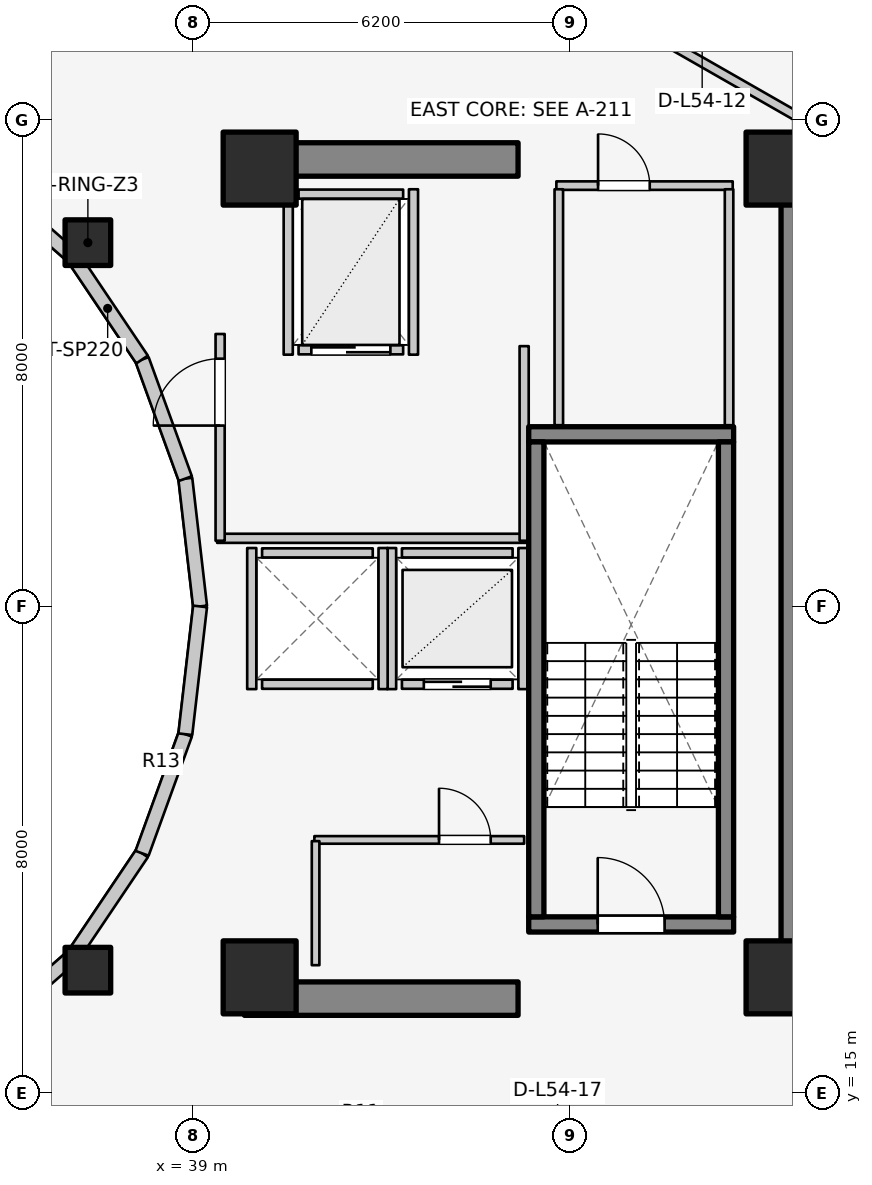
"""IFC4 building model, lengths in metres.
Left out: names, types, materials, properties, quantities, classifications, styles, units other than length and angle.
Written with IfcOpenShell. Run it as: python <this file> out.ifc"""

import sys

from ifc_helpers import new_model, si_unit, direction, frame, frame_2d, origin, origin_2d, place, context, subcontext, project, spatial, rectangle, extrude, element, fill, save


model = new_model("IFC4")
c1 = context("Model", 3, precision=1e-05, world=origin(), true_north=direction((0.0, 1.0)))
c2 = subcontext(c1, "Body", "Model", "MODEL_VIEW")
j1 = project(units=[si_unit("LENGTHUNIT", "METRE"), si_unit("PLANEANGLEUNIT", "RADIAN")], contexts=[c1])
p1 = place(None, origin())
s1 = spatial("IfcSite", under=j1, at=p1, CompositionType="ELEMENT")
p2 = place(p1, origin())
s2 = spatial("IfcBuilding", under=s1, at=p2, CompositionType="ELEMENT")
p3 = place(p2, frame((0.0, 0.0, 177.7)))
s3 = spatial("IfcBuildingStorey", under=s2, at=p3, CompositionType="ELEMENT", Elevation=177.7)
p4 = place(p3, frame((48.95, 17.05, 0.0), z_axis=(0.0, 0.0, 1.0), x_axis=(0.0, 1.0, 0.0)))
e1 = element("IfcWall", 1, at=p4, inside=s3, PredefinedType="SHEAR", context=c2, shape_type="SweptSolid", body=[
    extrude(rectangle(XDim=12.8, YDim=0.55, at=frame_2d((6.4, 0.0))), origin(), (0.0, 0.0, 1.0), 3.1),
])
for number, where, z_axis, x_axis in (
    (2, (39.85, 16.55, 0.0), (0.0, 0.0, 1.0), (1.0, 0.0, 0.0)),
    (3, (39.85, 30.35, 0.0), (0.0, 0.0, 1.0), (1.0, 0.0, 0.0)),
):
    element("IfcWall", number, at=place(p3, frame(where, z_axis=z_axis, x_axis=x_axis)), inside=s3, PredefinedType="SHEAR", context=c2, shape_type="SweptSolid", body=[
        extrude(rectangle(XDim=4.5, YDim=0.55, at=frame_2d((2.25, 0.0))), origin(), (0.0, 0.0, 1.0), 3.1),
    ])
p5 = place(p3, frame((44.525, 17.77, 0.0), z_axis=(0.0, 0.0, 1.0), x_axis=(1.0, 0.0, 0.0)))
e4 = element("IfcWall", 4, at=p5, inside=s3, PredefinedType="SOLIDWALL", context=c2, shape_type="SweptSolid", body=[
    extrude(rectangle(XDim=3.37, YDim=0.25, at=frame_2d((1.685, 0.0))), origin(), (0.0, 0.0, 1.0), 3.1),
])
p6 = place(p5, frame((1.135, 0.0, 0.0)))
e5 = element("IfcOpeningElement", 5, at=p6, cuts=e4, PredefinedType="OPENING", context=c2, shape_type="SweptSolid", body=[
    extrude(rectangle(XDim=1.1, YDim=2.1, at=frame_2d((0.55, 1.05))), frame((0.0, 0.135, 0.0), z_axis=(0.0, -1.0, 0.0), x_axis=(1.0, 0.0, 0.0)), (0.0, 0.0, 1.0), 0.27),
])
p7 = place(p3, frame((44.525, 25.83, 0.0), z_axis=(0.0, 0.0, 1.0), x_axis=(1.0, 0.0, 0.0)))
e6 = element("IfcWall", 6, at=p7, inside=s3, PredefinedType="SOLIDWALL", context=c2, shape_type="SweptSolid", body=[
    extrude(rectangle(XDim=3.37, YDim=0.25, at=frame_2d((1.685, 0.0))), origin(), (0.0, 0.0, 1.0), 3.1),
])
for number, where, z_axis, x_axis in (
    (7, (44.65, 17.895, 0.0), (0.0, 0.0, 1.0), (0.0, 1.0, 0.0)),
    (8, (47.77, 17.895, 0.0), (0.0, 0.0, 1.0), (0.0, 1.0, 0.0)),
):
    element("IfcWall", number, at=place(p3, frame(where, z_axis=z_axis, x_axis=x_axis)), inside=s3, PredefinedType="SOLIDWALL", context=c2, shape_type="SweptSolid", body=[
        extrude(rectangle(XDim=7.81, YDim=0.25, at=frame_2d((3.905, 0.0))), origin(), (0.0, 0.0, 1.0), 3.1),
    ])
for number, where, z_axis, x_axis in (
    (9, (40.1, 16.9, 0.0), (0.0, 0.0, 1.0), (1.0, 0.0, 0.0)),
    (10, (48.7, 16.9, 0.0), (0.0, 0.0, 1.0), (1.0, 0.0, 0.0)),
    (11, (48.7, 30.2, 0.0), (0.0, 0.0, 1.0), (1.0, 0.0, 0.0)),
    (12, (40.1, 30.2, 0.0), (0.0, 0.0, 1.0), (1.0, 0.0, 0.0)),
):
    element("IfcColumn", number, at=place(p3, frame(where, z_axis=z_axis, x_axis=x_axis)), inside=s3, PredefinedType="COLUMN", context=c2, shape_type="SweptSolid", body=[
        extrude(rectangle(XDim=1.2, YDim=1.2, at=origin_2d()), origin(), (0.0, 0.0, 1.0), 3.1),
    ])
for number, where, z_axis, x_axis in (
    (13, (37.275, 28.982, 0.0), (0.0, 0.0, 1.0), (1.0, 0.0, 0.0)),
    (14, (37.275, 17.018, 0.0), (0.0, 0.0, 1.0), (1.0, 0.0, 0.0)),
):
    element("IfcColumn", number, at=place(p3, frame(where, z_axis=z_axis, x_axis=x_axis)), inside=s3, PredefinedType="COLUMN", context=c2, shape_type="SweptSolid", body=[
        extrude(rectangle(XDim=0.75, YDim=0.75, at=origin_2d()), origin(), (0.0, 0.0, 1.0), 3.1),
    ])
p8 = place(p3, frame((39.12, 23.0, 0.0), z_axis=(0.0, 0.0, 1.0), x_axis=(-0.114711713601, 0.993398823617, 0.0)))
e15 = element("IfcWall", 15, at=p8, inside=s3, PredefinedType="STANDARD", context=c2, shape_type="SweptSolid", body=[
    extrude(rectangle(XDim=2.115, YDim=0.23, at=frame_2d((1.058, 0.0))), origin(), (0.0, 0.0, 1.0), 2.56),
])
p9 = place(p3, frame((38.877, 25.102, 0.0), z_axis=(0.0, 0.0, 1.0), x_axis=(-0.341423187295, 0.93990968033, 0.0)))
e16 = element("IfcWall", 16, at=p9, inside=s3, PredefinedType="STANDARD", context=c2, shape_type="SweptSolid", body=[
    extrude(rectangle(XDim=2.084, YDim=0.23, at=frame_2d((1.042, 0.0))), origin(), (0.0, 0.0, 1.0), 2.56),
])
p10 = place(p3, frame((38.166, 27.06, 0.0), z_axis=(0.0, 0.0, 1.0), x_axis=(-0.558197800898, 0.829707909492, 0.0)))
e17 = element("IfcWall", 17, at=p10, inside=s3, PredefinedType="STANDARD", context=c2, shape_type="SweptSolid", body=[
    extrude(rectangle(XDim=2.027, YDim=0.23, at=frame_2d((1.013, 0.0))), origin(), (0.0, 0.0, 1.0), 1.22),
])
for number, where, z_axis, x_axis in (
    (18, (37.035, 28.742, 0.0), (0.0, 0.0, 1.0), (-0.753, 0.659, 0.0)),
    (19, (35.56, 15.968, 0.0), (0.0, 0.0, 1.0), (0.753, 0.659, 0.0)),
):
    element("IfcWall", number, at=place(p3, frame(where, z_axis=z_axis, x_axis=x_axis)), inside=s3, PredefinedType="STANDARD", context=c2, shape_type="SweptSolid", body=[
        extrude(rectangle(XDim=1.959, YDim=0.23, at=frame_2d((0.98, 0.0))), origin(), (0.0, 0.0, 1.0), 1.22),
    ])
p11 = place(p3, frame((37.035, 17.258, 0.0), z_axis=(0.0, 0.0, 1.0), x_axis=(0.558197800898, 0.829707909492, 0.0)))
e20 = element("IfcWall", 20, at=p11, inside=s3, PredefinedType="STANDARD", context=c2, shape_type="SweptSolid", body=[
    extrude(rectangle(XDim=2.027, YDim=0.23, at=frame_2d((1.013, 0.0))), origin(), (0.0, 0.0, 1.0), 1.22),
])
p12 = place(p3, frame((38.166, 18.94, 0.0), z_axis=(0.0, 0.0, 1.0), x_axis=(0.341423187295, 0.93990968033, 0.0)))
e21 = element("IfcWall", 21, at=p12, inside=s3, PredefinedType="STANDARD", context=c2, shape_type="SweptSolid", body=[
    extrude(rectangle(XDim=2.084, YDim=0.23, at=frame_2d((1.042, 0.0))), origin(), (0.0, 0.0, 1.0), 2.56),
])
p13 = place(p3, frame((38.877, 20.898, 0.0), z_axis=(0.0, 0.0, 1.0), x_axis=(0.114711713601, 0.993398823617, 0.0)))
e22 = element("IfcWall", 22, at=p13, inside=s3, PredefinedType="STANDARD", context=c2, shape_type="SweptSolid", body=[
    extrude(rectangle(XDim=2.115, YDim=0.23, at=frame_2d((1.058, 0.0))), origin(), (0.0, 0.0, 1.0), 2.56),
])
p14 = place(p3, frame((42.44, 21.72, 0.0), z_axis=(0.0, 0.0, 1.0), x_axis=(1.0, 0.0, 0.0)))
e23 = element("IfcWall", 23, at=p14, inside=s3, PredefinedType="SOLIDWALL", context=c2, shape_type="SweptSolid", body=[
    extrude(rectangle(XDim=1.82, YDim=0.15, at=frame_2d((0.91, 0.0))), origin(), (0.0, 0.0, 1.0), 2.575),
])
p15 = place(p14, frame((0.36, 0.0, 0.0)))
e24 = element("IfcOpeningElement", 24, at=p15, cuts=e23, PredefinedType="OPENING", context=c2, shape_type="SweptSolid", body=[
    extrude(rectangle(XDim=1.1, YDim=2.1, at=frame_2d((0.55, 1.05))), frame((0.0, 0.085, 0.0), z_axis=(0.0, -1.0, 0.0), x_axis=(1.0, 0.0, 0.0)), (0.0, 0.0, 1.0), 0.17),
])
p16 = place(p3, frame((42.44, 23.88, 0.0), z_axis=(0.0, 0.0, 1.0), x_axis=(1.0, 0.0, 0.0)))
e25 = element("IfcWall", 25, at=p16, inside=s3, PredefinedType="SOLIDWALL", context=c2, shape_type="SweptSolid", body=[
    extrude(rectangle(XDim=1.82, YDim=0.15, at=frame_2d((0.91, 0.0))), origin(), (0.0, 0.0, 1.0), 2.575),
])
for number, where, z_axis, x_axis in (
    (26, (42.27, 21.64, 0.0), (0.0, 0.0, 1.0), (0.0, 1.0, 0.0)),
    (27, (44.43, 21.64, 0.0), (0.0, 0.0, 1.0), (0.0, 1.0, 0.0)),
):
    element("IfcWall", number, at=place(p3, frame(where, z_axis=z_axis, x_axis=x_axis)), inside=s3, PredefinedType="SOLIDWALL", context=c2, shape_type="SweptSolid", body=[
        extrude(rectangle(XDim=2.32, YDim=0.15, at=frame_2d((1.16, 0.0))), origin(), (0.0, 0.0, 1.0), 2.575),
    ])
for number, where, z_axis, x_axis in (
    (28, (40.14, 21.72, 0.0), (0.0, 0.0, 1.0), (1.0, 0.0, 0.0)),
    (29, (40.14, 23.88, 0.0), (0.0, 0.0, 1.0), (1.0, 0.0, 0.0)),
):
    element("IfcWall", number, at=place(p3, frame(where, z_axis=z_axis, x_axis=x_axis)), inside=s3, PredefinedType="SOLIDWALL", context=c2, shape_type="SweptSolid", body=[
        extrude(rectangle(XDim=1.82, YDim=0.15, at=frame_2d((0.91, 0.0))), origin(), (0.0, 0.0, 1.0), 2.12),
    ])
p17 = place(p3, frame((39.97, 21.64, 0.0), z_axis=(0.0, 0.0, 1.0), x_axis=(0.0, 1.0, 0.0)))
e30 = element("IfcWall", 30, at=p17, inside=s3, PredefinedType="SOLIDWALL", context=c2, shape_type="SweptSolid", body=[
    extrude(rectangle(XDim=2.32, YDim=0.15, at=frame_2d((1.16, 0.0))), origin(), (0.0, 0.0, 1.0), 2.12),
])
p18 = place(p3, frame((42.13, 21.64, 0.0), z_axis=(0.0, 0.0, 1.0), x_axis=(0.0, 1.0, 0.0)))
e31 = element("IfcWall", 31, at=p18, inside=s3, PredefinedType="SOLIDWALL", context=c2, shape_type="SweptSolid", body=[
    extrude(rectangle(XDim=2.32, YDim=0.15, at=frame_2d((1.16, 0.0))), origin(), (0.0, 0.0, 1.0), 2.575),
])
p19 = place(p3, frame((40.74, 27.22, 0.0), z_axis=(0.0, 0.0, 1.0), x_axis=(1.0, 0.0, 0.0)))
e32 = element("IfcWall", 32, at=p19, inside=s3, PredefinedType="SOLIDWALL", context=c2, shape_type="SweptSolid", body=[
    extrude(rectangle(XDim=1.72, YDim=0.15, at=frame_2d((0.86, 0.0))), origin(), (0.0, 0.0, 1.0), 2.575),
])
p20 = place(p19, frame((0.21, 0.0, 0.0)))
e33 = element("IfcOpeningElement", 33, at=p20, cuts=e32, PredefinedType="OPENING", context=c2, shape_type="SweptSolid", body=[
    extrude(rectangle(XDim=1.3, YDim=2.1, at=frame_2d((0.65, 1.05))), frame((0.0, 0.085, 0.0), z_axis=(0.0, -1.0, 0.0), x_axis=(1.0, 0.0, 0.0)), (0.0, 0.0, 1.0), 0.17),
])
p21 = place(p3, frame((40.74, 29.78, 0.0), z_axis=(0.0, 0.0, 1.0), x_axis=(1.0, 0.0, 0.0)))
e34 = element("IfcWall", 34, at=p21, inside=s3, PredefinedType="SOLIDWALL", context=c2, shape_type="SweptSolid", body=[
    extrude(rectangle(XDim=1.72, YDim=0.15, at=frame_2d((0.86, 0.0))), origin(), (0.0, 0.0, 1.0), 2.575),
])
for number, where, z_axis, x_axis in (
    (35, (40.57, 27.14, 0.0), (0.0, 0.0, 1.0), (0.0, 1.0, 0.0)),
    (36, (42.63, 27.14, 0.0), (0.0, 0.0, 1.0), (0.0, 1.0, 0.0)),
):
    element("IfcWall", number, at=place(p3, frame(where, z_axis=z_axis, x_axis=x_axis)), inside=s3, PredefinedType="SOLIDWALL", context=c2, shape_type="SweptSolid", body=[
        extrude(rectangle(XDim=2.72, YDim=0.15, at=frame_2d((1.36, 0.0))), origin(), (0.0, 0.0, 1.0), 2.575),
    ])
p22 = place(p3, frame((39.4, 24.12, 0.0), z_axis=(0.0, 0.0, 1.0), x_axis=(1.0, 0.0, 0.0)))
e37 = element("IfcWall", 37, at=p22, inside=s3, PredefinedType="PARTITIONING", context=c2, shape_type="SweptSolid", body=[
    extrude(rectangle(XDim=5.08, YDim=0.15, at=frame_2d((2.54, 0.0))), origin(), (0.0, 0.0, 1.0), 2.12),
])
p23 = place(p3, frame((44.45, 24.08, 0.0), z_axis=(0.0, 0.0, 1.0), x_axis=(0.0, 1.0, 0.0)))
e38 = element("IfcWall", 38, at=p23, inside=s3, PredefinedType="PARTITIONING", context=c2, shape_type="SweptSolid", body=[
    extrude(rectangle(XDim=3.2, YDim=0.15, at=frame_2d((1.6, 0.0))), origin(), (0.0, 0.0, 1.0), 2.575),
])
p24 = place(p3, frame((39.45, 24.08, 0.0), z_axis=(0.0, 0.0, 1.0), x_axis=(0.0, 1.0, 0.0)))
e39 = element("IfcWall", 39, at=p24, inside=s3, PredefinedType="PARTITIONING", context=c2, shape_type="SweptSolid", body=[
    extrude(rectangle(XDim=3.4, YDim=0.15, at=frame_2d((1.7, 0.0))), origin(), (0.0, 0.0, 1.0), 2.575),
])
p25 = place(p24, frame((1.894, 0.0, 0.0)))
e40 = element("IfcOpeningElement", 40, at=p25, cuts=e39, PredefinedType="OPENING", context=c2, shape_type="SweptSolid", body=[
    extrude(rectangle(XDim=1.1, YDim=2.1, at=frame_2d((0.55, 1.05))), frame((0.0, 0.085, 0.0), z_axis=(0.0, -1.0, 0.0), x_axis=(1.0, 0.0, 0.0)), (0.0, 0.0, 1.0), 0.17),
])
p26 = place(p3, frame((41.0, 19.16, 0.0), z_axis=(0.0, 0.0, 1.0), x_axis=(1.0, 0.0, 0.0)))
e41 = element("IfcWall", 41, at=p26, inside=s3, PredefinedType="PARTITIONING", context=c2, shape_type="SweptSolid", body=[
    extrude(rectangle(XDim=3.45, YDim=0.125, at=frame_2d((1.725, 0.0))), origin(), (0.0, 0.0, 1.0), 2.12),
])
p27 = place(p26, frame((2.05, 0.0, 0.0)))
e42 = element("IfcOpeningElement", 42, at=p27, cuts=e41, PredefinedType="OPENING", context=c2, shape_type="SweptSolid", body=[
    extrude(rectangle(XDim=0.85, YDim=2.05, at=frame_2d((0.425, 1.025))), frame((0.0, 0.073, 0.0), z_axis=(0.0, -1.0, 0.0), x_axis=(1.0, 0.0, 0.0)), (0.0, 0.0, 1.0), 0.145),
])
p28 = place(p3, frame((41.02, 17.1, 0.0), z_axis=(0.0, 0.0, 1.0), x_axis=(0.0, 1.0, 0.0)))
e43 = element("IfcWall", 43, at=p28, inside=s3, PredefinedType="PARTITIONING", context=c2, shape_type="SweptSolid", body=[
    extrude(rectangle(XDim=2.04, YDim=0.125, at=frame_2d((1.02, 0.0))), origin(), (0.0, 0.0, 1.0), 2.575),
])
p29 = place(p3, frame((44.98, 29.92, 0.0), z_axis=(0.0, 0.0, 1.0), x_axis=(1.0, 0.0, 0.0)))
e44 = element("IfcWall", 44, at=p29, inside=s3, PredefinedType="PLUMBINGWALL", context=c2, shape_type="SweptSolid", body=[
    extrude(rectangle(XDim=2.9, YDim=0.14, at=frame_2d((1.45, 0.0))), origin(), (0.0, 0.0, 1.0), 2.575),
])
p30 = place(p29, frame((0.686, 0.0, 0.0)))
e45 = element("IfcOpeningElement", 45, at=p30, cuts=e44, PredefinedType="OPENING", context=c2, shape_type="SweptSolid", body=[
    extrude(rectangle(XDim=0.85, YDim=2.05, at=frame_2d((0.425, 1.025))), frame((0.0, 0.08, 0.0), z_axis=(0.0, -1.0, 0.0), x_axis=(1.0, 0.0, 0.0)), (0.0, 0.0, 1.0), 0.16),
])
for number, where, z_axis, x_axis in (
    (46, (45.02, 25.98, 0.0), (0.0, 0.0, 1.0), (0.0, 1.0, 0.0)),
    (47, (47.82, 25.98, 0.0), (0.0, 0.0, 1.0), (0.0, 1.0, 0.0)),
):
    element("IfcWall", number, at=place(p3, frame(where, z_axis=z_axis, x_axis=x_axis)), inside=s3, PredefinedType="PLUMBINGWALL", context=c2, shape_type="SweptSolid", body=[
        extrude(rectangle(XDim=3.88, YDim=0.14, at=frame_2d((1.94, 0.0))), origin(), (0.0, 0.0, 1.0), 2.575),
    ])
p31 = place(p3, frame((46.757, 32.305, 0.0), z_axis=(0.0, 0.0, 1.0), x_axis=(0.867991349648, -0.496579315857, 0.0)))
e48 = element("IfcWall", 48, at=p31, inside=s3, PredefinedType="PARTITIONING", context=c2, shape_type="SweptSolid", body=[
    extrude(rectangle(XDim=2.567, YDim=0.15, at=frame_2d((1.283, 0.0))), origin(), (0.0, 0.0, 1.0), 1.22),
])
p32 = place(p3, frame((35.55, 15.985, 0.0), z_axis=(0.0, 0.0, 1.0), x_axis=(0.523587550846, -0.851971875474, 0.0)))
e49 = element("IfcWall", 49, at=p32, inside=s3, PredefinedType="PARTITIONING", context=c2, shape_type="SweptSolid", body=[
    extrude(rectangle(XDim=3.153, YDim=0.125, at=frame_2d((1.577, 0.0))), origin(), (0.0, 0.0, 1.0), 2.019),
])
p33 = place(p6, origin())
e50 = element("IfcDoor", 50, at=p33, inside=s3, OperationType="SINGLE_SWING_LEFT", PredefinedType="DOOR", context=c2, shape_type="SweptSolid", body=[
    extrude(rectangle(XDim=1.1, YDim=2.1, at=frame_2d((0.55, 1.05))), frame((0.0, 0.025, 0.0), z_axis=(0.0, -1.0, 0.0), x_axis=(1.0, 0.0, 0.0)), (0.0, 0.0, 1.0), 0.05),
])
fill(e5, e50)
p34 = place(p15, origin())
e51 = element("IfcDoor", 51, at=p34, inside=s3, OperationType="DOUBLE_DOOR_SLIDING", PredefinedType="DOOR", context=c2, shape_type="SweptSolid", body=[
    extrude(rectangle(XDim=1.1, YDim=2.1, at=frame_2d((0.55, 1.05))), frame((0.0, 0.025, 0.0), z_axis=(0.0, -1.0, 0.0), x_axis=(1.0, 0.0, 0.0)), (0.0, 0.0, 1.0), 0.05),
])
fill(e24, e51)
p35 = place(p20, origin())
e52 = element("IfcDoor", 52, at=p35, inside=s3, OperationType="DOUBLE_DOOR_SLIDING", PredefinedType="DOOR", context=c2, shape_type="SweptSolid", body=[
    extrude(rectangle(XDim=1.3, YDim=2.1, at=frame_2d((0.65, 1.05))), frame((0.0, 0.025, 0.0), z_axis=(0.0, -1.0, 0.0), x_axis=(1.0, 0.0, 0.0)), (0.0, 0.0, 1.0), 0.05),
])
fill(e33, e52)
p36 = place(p25, origin())
e53 = element("IfcDoor", 53, at=p36, inside=s3, OperationType="SINGLE_SWING_LEFT", PredefinedType="DOOR", context=c2, shape_type="SweptSolid", body=[
    extrude(rectangle(XDim=1.1, YDim=2.1, at=frame_2d((0.55, 1.05))), frame((0.0, 0.025, 0.0), z_axis=(0.0, -1.0, 0.0), x_axis=(1.0, 0.0, 0.0)), (0.0, 0.0, 1.0), 0.05),
])
fill(e40, e53)
p37 = place(p27, origin())
e54 = element("IfcDoor", 54, at=p37, inside=s3, OperationType="SINGLE_SWING_LEFT", PredefinedType="DOOR", context=c2, shape_type="SweptSolid", body=[
    extrude(rectangle(XDim=0.85, YDim=2.05, at=frame_2d((0.425, 1.025))), frame((0.0, 0.025, 0.0), z_axis=(0.0, -1.0, 0.0), x_axis=(1.0, 0.0, 0.0)), (0.0, 0.0, 1.0), 0.05),
])
fill(e42, e54)
p38 = place(p30, origin())
e55 = element("IfcDoor", 55, at=p38, inside=s3, OperationType="SINGLE_SWING_LEFT", PredefinedType="DOOR", context=c2, shape_type="SweptSolid", body=[
    extrude(rectangle(XDim=0.85, YDim=2.05, at=frame_2d((0.425, 1.025))), frame((0.0, 0.025, 0.0), z_axis=(0.0, -1.0, 0.0), x_axis=(1.0, 0.0, 0.0)), (0.0, 0.0, 1.0), 0.05),
])
fill(e45, e55)
save(model, sys.argv[1])
